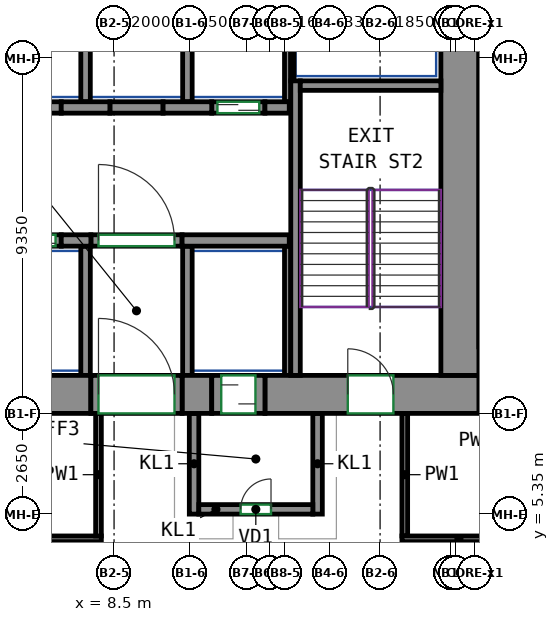
"""IFC4 building model, lengths in metres.
Left out: names, types, materials, properties, quantities, classifications, styles, units other than length and angle.
Written with IfcOpenShell. Run it as: python <this file> out.ifc"""

import sys

from ifc_helpers import new_model, si_unit, direction, frame, frame_2d, origin, place, context, subcontext, project, spatial, rectangle, extrude, source, transform, mapped, element, fill, save


model = new_model("IFC4")
c1 = context("Model", 3, precision=1e-05, world=origin(), true_north=direction((0.0, 1.0)))
c2 = subcontext(c1, "Body", "Model", "MODEL_VIEW")
j1 = project(units=[si_unit("LENGTHUNIT", "METRE"), si_unit("PLANEANGLEUNIT", "RADIAN")], contexts=[c1])
p1 = place(None, origin())
s1 = spatial("IfcSite", under=j1, at=p1, CompositionType="ELEMENT")
p2 = place(p1, origin())
s2 = spatial("IfcBuilding", under=s1, at=p2, CompositionType="ELEMENT")
p3 = place(p2, frame((0.0, 0.0, 67.2)))
s3 = spatial("IfcBuildingStorey", under=s2, at=p3, CompositionType="ELEMENT", Elevation=67.2)
m1 = source(origin(), c2, "Body", "SweptSolid", [
    extrude(rectangle(XDim=14.18, YDim=1.0, at=frame_2d((7.09, 0.0))), origin(), (0.0, 0.0, 1.0), 3.72),
])
p4 = place(p3, frame((-6.29, 8.5, 0.0), z_axis=(0.0, 0.0, 1.0), x_axis=(1.0, 0.0, 0.0)))
e1 = element("IfcWall", 1, at=p4, inside=s3, PredefinedType="SHEAR", context=c2, shape_type="MappedRepresentation", body=[
    mapped(m1, transform((0.0, 0.0, 0.0))),
])
m2 = source(origin(), c2, "Body", "SweptSolid", [
    extrude(rectangle(XDim=0.78, YDim=1.0, at=frame_2d((0.39, 0.0))), origin(), (0.0, 0.0, 1.0), 3.72),
])
p5 = place(p3, frame((10.29, 8.5, 0.0), z_axis=(0.0, 0.0, 1.0), x_axis=(1.0, 0.0, 0.0)))
e2 = element("IfcWall", 2, at=p5, inside=s3, PredefinedType="SHEAR", context=c2, shape_type="MappedRepresentation", body=[
    mapped(m2, transform((0.0, 0.0, 0.0))),
])
m3 = source(origin(), c2, "Body", "SweptSolid", [
    extrude(rectangle(XDim=5.63, YDim=1.0, at=frame_2d((2.815, 0.0))), origin(), (0.0, 0.0, 1.0), 3.72),
])
p6 = place(p3, frame((12.47, 8.5, 0.0), z_axis=(0.0, 0.0, 1.0), x_axis=(1.0, 0.0, 0.0)))
e3 = element("IfcWall", 3, at=p6, inside=s3, PredefinedType="SHEAR", context=c2, shape_type="MappedRepresentation", body=[
    mapped(m3, transform((0.0, 0.0, 0.0))),
])
p7 = place(p6, frame((2.18, 0.0, 0.0)))
e4 = element("IfcOpeningElement", 4, at=p7, cuts=e3, PredefinedType="OPENING", context=c2, shape_type="SweptSolid", body=[
    extrude(rectangle(XDim=1.2, YDim=2.1, at=frame_2d((0.6, 1.05))), frame((0.0, 0.51, 0.0), z_axis=(0.0, -1.0, 0.0), x_axis=(1.0, 0.0, 0.0)), (0.0, 0.0, 1.0), 1.02),
])
m4 = source(origin(), c2, "Body", "SweptSolid", [
    extrude(rectangle(XDim=12.0, YDim=1.0, at=frame_2d((6.0, 0.0))), origin(), (0.0, 0.0, 1.0), 3.72),
])
p8 = place(p3, frame((17.6, 9.0, 0.0), z_axis=(0.0, 0.0, 1.0), x_axis=(0.0, 1.0, 0.0)))
e5 = element("IfcWall", 5, at=p8, inside=s3, PredefinedType="SHEAR", context=c2, shape_type="MappedRepresentation", body=[
    mapped(m4, transform((0.0, 0.0, 0.0))),
])
m5 = source(origin(), c2, "Body", "SweptSolid", [
    extrude(rectangle(XDim=7.75, YDim=0.25, at=frame_2d((3.875, 0.0))), origin(), (0.0, 0.0, 1.0), 3.72),
])
p9 = place(p3, frame((13.275, 9.0, 0.0), z_axis=(0.0, 0.0, 1.0), x_axis=(0.0, 1.0, 0.0)))
e6 = element("IfcWall", 6, at=p9, inside=s3, PredefinedType="SHEAR", context=c2, shape_type="MappedRepresentation", body=[
    mapped(m5, transform((0.0, 0.0, 0.0))),
])
m6 = source(origin(), c2, "Body", "SweptSolid", [
    extrude(rectangle(XDim=3.7, YDim=0.25, at=frame_2d((1.85, 0.0))), origin(), (0.0, 0.0, 1.0), 3.72),
])
p10 = place(p3, frame((13.4, 16.625, 0.0), z_axis=(0.0, 0.0, 1.0), x_axis=(1.0, 0.0, 0.0)))
e7 = element("IfcWall", 7, at=p10, inside=s3, PredefinedType="SHEAR", context=c2, shape_type="MappedRepresentation", body=[
    mapped(m6, transform((0.0, 0.0, 0.0))),
])
m7 = source(origin(), c2, "Body", "SweptSolid", [
    extrude(rectangle(XDim=0.78, YDim=0.3, at=frame_2d((0.39, 0.0))), origin(), (0.0, 0.0, 1.0), 3.72),
])
p11 = place(p3, frame((7.11, 12.55, 0.0), z_axis=(0.0, 0.0, 1.0), x_axis=(1.0, 0.0, 0.0)))
e8 = element("IfcWall", 8, at=p11, inside=s3, PredefinedType="SHEAR", context=c2, shape_type="MappedRepresentation", body=[
    mapped(m7, transform((0.0, 0.0, 0.0))),
])
m8 = source(origin(), c2, "Body", "SweptSolid", [
    extrude(rectangle(XDim=2.82, YDim=0.3, at=frame_2d((1.41, 0.0))), origin(), (0.0, 0.0, 1.0), 3.72),
])
p12 = place(p3, frame((10.29, 12.55, 0.0), z_axis=(0.0, 0.0, 1.0), x_axis=(1.0, 0.0, 0.0)))
e9 = element("IfcWall", 9, at=p12, inside=s3, PredefinedType="SHEAR", context=c2, shape_type="MappedRepresentation", body=[
    mapped(m8, transform((0.0, 0.0, 0.0))),
])
m9 = source(origin(), c2, "Body", "SweptSolid", [
    extrude(rectangle(XDim=1.28, YDim=0.3, at=frame_2d((0.64, 0.0))), origin(), (0.0, 0.0, 1.0), 3.72),
])
p13 = place(p3, frame((7.11, 16.05, 0.0), z_axis=(0.0, 0.0, 1.0), x_axis=(1.0, 0.0, 0.0)))
e10 = element("IfcWall", 10, at=p13, inside=s3, PredefinedType="SHEAR", context=c2, shape_type="MappedRepresentation", body=[
    mapped(m9, transform((0.0, 0.0, 0.0))),
])
m10 = source(origin(), c2, "Body", "SweptSolid", [
    extrude(rectangle(XDim=1.28, YDim=0.3, at=frame_2d((0.64, 0.0))), origin(), (0.0, 0.0, 1.0), 3.72),
])
p14 = place(p3, frame((9.79, 16.05, 0.0), z_axis=(0.0, 0.0, 1.0), x_axis=(1.0, 0.0, 0.0)))
e11 = element("IfcWall", 11, at=p14, inside=s3, PredefinedType="SHEAR", context=c2, shape_type="MappedRepresentation", body=[
    mapped(m10, transform((0.0, 0.0, 0.0))),
])
m11 = source(origin(), c2, "Body", "SweptSolid", [
    extrude(rectangle(XDim=0.64, YDim=0.3, at=frame_2d((0.32, 0.0))), origin(), (0.0, 0.0, 1.0), 3.72),
])
p15 = place(p3, frame((12.47, 16.05, 0.0), z_axis=(0.0, 0.0, 1.0), x_axis=(1.0, 0.0, 0.0)))
e12 = element("IfcWall", 12, at=p15, inside=s3, PredefinedType="SHEAR", context=c2, shape_type="MappedRepresentation", body=[
    mapped(m11, transform((0.0, 0.0, 0.0))),
])
m12 = source(origin(), c2, "Body", "SweptSolid", [
    extrude(rectangle(XDim=1.4, YDim=0.3, at=frame_2d((0.7, 0.0))), origin(), (0.0, 0.0, 1.0), 3.72),
])
p16 = place(p3, frame((5.71, 12.55, 0.0), z_axis=(0.0, 0.0, 1.0), x_axis=(1.0, 0.0, 0.0)))
e13 = element("IfcWall", 13, at=p16, inside=s3, PredefinedType="PARTITIONING", context=c2, shape_type="MappedRepresentation", body=[
    mapped(m12, transform((0.0, 0.0, 0.0))),
])
p17 = place(p16, frame((0.15, 0.0, 0.0)))
e14 = element("IfcOpeningElement", 14, at=p17, cuts=e13, PredefinedType="OPENING", context=c2, shape_type="SweptSolid", body=[
    extrude(rectangle(XDim=1.1, YDim=2.1, at=frame_2d((0.55, 1.05))), frame((0.0, 0.16, 0.0), z_axis=(0.0, -1.0, 0.0), x_axis=(1.0, 0.0, 0.0)), (0.0, 0.0, 1.0), 0.32),
])
m13 = source(origin(), c2, "Body", "SweptSolid", [
    extrude(rectangle(XDim=1.4, YDim=0.3, at=frame_2d((0.7, 0.0))), origin(), (0.0, 0.0, 1.0), 3.72),
])
p18 = place(p3, frame((11.07, 16.05, 0.0), z_axis=(0.0, 0.0, 1.0), x_axis=(1.0, 0.0, 0.0)))
e15 = element("IfcWall", 15, at=p18, inside=s3, PredefinedType="PARTITIONING", context=c2, shape_type="MappedRepresentation", body=[
    mapped(m13, transform((0.0, 0.0, 0.0))),
])
p19 = place(p18, frame((0.15, 0.0, 0.0)))
e16 = element("IfcOpeningElement", 16, at=p19, cuts=e15, PredefinedType="OPENING", context=c2, shape_type="SweptSolid", body=[
    extrude(rectangle(XDim=1.1, YDim=2.1, at=frame_2d((0.55, 1.05))), frame((0.0, 0.16, 0.0), z_axis=(0.0, -1.0, 0.0), x_axis=(1.0, 0.0, 0.0)), (0.0, 0.0, 1.0), 0.32),
])
m14 = source(origin(), c2, "Body", "SweptSolid", [
    extrude(rectangle(XDim=2.4, YDim=0.3, at=frame_2d((1.2, 0.0))), origin(), (0.0, 0.0, 1.0), 3.72),
])
p20 = place(p3, frame((7.89, 12.55, 0.0), z_axis=(0.0, 0.0, 1.0), x_axis=(1.0, 0.0, 0.0)))
e17 = element("IfcWall", 17, at=p20, inside=s3, PredefinedType="PARTITIONING", context=c2, shape_type="MappedRepresentation", body=[
    mapped(m14, transform((0.0, 0.0, 0.0))),
])
p21 = place(p20, frame((0.2, 0.0, 0.0)))
e18 = element("IfcOpeningElement", 18, at=p21, cuts=e17, PredefinedType="OPENING", context=c2, shape_type="SweptSolid", body=[
    extrude(rectangle(XDim=2.0, YDim=2.1, at=frame_2d((1.0, 1.05))), frame((0.0, 0.16, 0.0), z_axis=(0.0, -1.0, 0.0), x_axis=(1.0, 0.0, 0.0)), (0.0, 0.0, 1.0), 0.32),
])
for number, where, z_axis, x_axis in (
    (19, (5.71, 16.05, 0.0), (0.0, 0.0, 1.0), (1.0, 0.0, 0.0)),
    (20, (8.39, 16.05, 0.0), (0.0, 0.0, 1.0), (1.0, 0.0, 0.0)),
):
    element("IfcWall", number, at=place(p3, frame(where, z_axis=z_axis, x_axis=x_axis)), inside=s3, PredefinedType="PARTITIONING", context=c2, shape_type="MappedRepresentation", body=[
        mapped(m12, transform((0.0, 0.0, 0.0))),
    ])
m15 = source(origin(), c2, "Body", "SweptSolid", [
    extrude(rectangle(XDim=2.65, YDim=0.25, at=frame_2d((1.325, 0.0))), origin(), (0.0, 0.0, 1.0), 3.72),
])
for number, where, z_axis, x_axis in (
    (21, (10.605, 5.35, 0.0), (0.0, 0.0, 1.0), (0.0, 1.0, 0.0)),
    (22, (13.855, 5.35, 0.0), (0.0, 0.0, 1.0), (0.0, 1.0, 0.0)),
):
    element("IfcWall", number, at=place(p3, frame(where, z_axis=z_axis, x_axis=x_axis)), inside=s3, PredefinedType="PARTITIONING", context=c2, shape_type="MappedRepresentation", body=[
        mapped(m15, transform((0.0, 0.0, 0.0))),
    ])
m16 = source(origin(), c2, "Body", "SweptSolid", [
    extrude(rectangle(XDim=3.0, YDim=0.25, at=frame_2d((1.5, 0.0))), origin(), (0.0, 0.0, 1.0), 3.72),
])
p22 = place(p3, frame((10.73, 5.475, 0.0), z_axis=(0.0, 0.0, 1.0), x_axis=(1.0, 0.0, 0.0)))
e23 = element("IfcWall", 23, at=p22, inside=s3, PredefinedType="PARTITIONING", context=c2, shape_type="MappedRepresentation", body=[
    mapped(m16, transform((0.0, 0.0, 0.0))),
])
p23 = place(p22, frame((1.1, 0.0, 0.0)))
e24 = element("IfcOpeningElement", 24, at=p23, cuts=e23, PredefinedType="OPENING", context=c2, shape_type="SweptSolid", body=[
    extrude(rectangle(XDim=0.8, YDim=2.0, at=frame_2d((0.4, 1.0))), frame((0.0, 0.135, 0.0), z_axis=(0.0, -1.0, 0.0), x_axis=(1.0, 0.0, 0.0)), (0.0, 0.0, 1.0), 0.27),
])
m17 = source(origin(), c2, "Body", "SweptSolid", [
    extrude(rectangle(XDim=3.275, YDim=0.165, at=frame_2d((1.638, 0.0))), origin(), (0.0, 0.0, 1.0), 3.72),
])
p24 = place(p3, frame((13.067, 16.2, 0.0), z_axis=(0.0, 0.0, 1.0), x_axis=(0.0, 1.0, 0.0)))
e25 = element("IfcWall", 25, at=p24, inside=s3, PredefinedType="PARTITIONING", context=c2, shape_type="MappedRepresentation", body=[
    mapped(m17, transform((0.0, 0.0, 0.0))),
])
m18 = source(origin(), c2, "Body", "SweptSolid", [
    extrude(rectangle(XDim=3.275, YDim=0.25, at=frame_2d((1.638, 0.0))), origin(), (0.0, 0.0, 1.0), 3.72),
])
p25 = place(p3, frame((10.43, 16.2, 0.0), z_axis=(0.0, 0.0, 1.0), x_axis=(0.0, 1.0, 0.0)))
e26 = element("IfcWall", 26, at=p25, inside=s3, PredefinedType="PARTITIONING", context=c2, shape_type="MappedRepresentation", body=[
    mapped(m18, transform((0.0, 0.0, 0.0))),
])
m19 = source(origin(), c2, "Body", "SweptSolid", [
    extrude(rectangle(XDim=2.725, YDim=0.085, at=frame_2d((1.363, 0.0))), origin(), (0.0, 0.0, 1.0), 3.72),
])
p26 = place(p3, frame((13.192, 16.75, 0.0), z_axis=(0.0, 0.0, 1.0), x_axis=(0.0, 1.0, 0.0)))
e27 = element("IfcWall", 27, at=p26, inside=s3, PredefinedType="PARTITIONING", context=c2, shape_type="MappedRepresentation", body=[
    mapped(m19, transform((0.0, 0.0, 0.0))),
])
p27 = place(p3, frame((7.75, 16.2, 0.0), z_axis=(0.0, 0.0, 1.0), x_axis=(0.0, 1.0, 0.0)))
e28 = element("IfcWall", 28, at=p27, inside=s3, PredefinedType="PARTITIONING", context=c2, shape_type="MappedRepresentation", body=[
    mapped(m18, transform((0.0, 0.0, 0.0))),
])
m20 = source(origin(), c2, "Body", "SweptSolid", [
    extrude(rectangle(XDim=3.4, YDim=0.25, at=frame_2d((1.7, 0.0))), origin(), (0.0, 0.0, 1.0), 3.72),
])
p28 = place(p3, frame((10.43, 9.0, 0.0), z_axis=(0.0, 0.0, 1.0), x_axis=(0.0, 1.0, 0.0)))
e29 = element("IfcWall", 29, at=p28, inside=s3, PredefinedType="PARTITIONING", context=c2, shape_type="MappedRepresentation", body=[
    mapped(m20, transform((0.0, 0.0, 0.0))),
])
m21 = source(origin(), c2, "Body", "SweptSolid", [
    extrude(rectangle(XDim=3.4, YDim=0.165, at=frame_2d((1.7, 0.0))), origin(), (0.0, 0.0, 1.0), 3.72),
])
p29 = place(p3, frame((13.067, 9.0, 0.0), z_axis=(0.0, 0.0, 1.0), x_axis=(0.0, 1.0, 0.0)))
e30 = element("IfcWall", 30, at=p29, inside=s3, PredefinedType="PARTITIONING", context=c2, shape_type="MappedRepresentation", body=[
    mapped(m21, transform((0.0, 0.0, 0.0))),
])
p30 = place(p3, frame((7.75, 9.0, 0.0), z_axis=(0.0, 0.0, 1.0), x_axis=(0.0, 1.0, 0.0)))
e31 = element("IfcWall", 31, at=p30, inside=s3, PredefinedType="PARTITIONING", context=c2, shape_type="MappedRepresentation", body=[
    mapped(m20, transform((0.0, 0.0, 0.0))),
])
m22 = source(origin(), c2, "Body", "SweptSolid", [
    extrude(rectangle(XDim=2.4, YDim=1.0, at=frame_2d((1.2, 0.0))), origin(), (0.0, 0.0, 1.0), 2.7),
])
p31 = place(p3, frame((7.89, 8.5, 0.0), z_axis=(0.0, 0.0, 1.0), x_axis=(1.0, 0.0, 0.0)))
e32 = element("IfcWall", 32, at=p31, inside=s3, PredefinedType="PARTITIONING", context=c2, shape_type="MappedRepresentation", body=[
    mapped(m22, transform((0.0, 0.0, 0.0))),
])
p32 = place(p31, frame((0.2, 0.0, 0.0)))
e33 = element("IfcOpeningElement", 33, at=p32, cuts=e32, PredefinedType="OPENING", context=c2, shape_type="SweptSolid", body=[
    extrude(rectangle(XDim=2.0, YDim=2.1, at=frame_2d((1.0, 1.05))), frame((0.0, 0.51, 0.0), z_axis=(0.0, -1.0, 0.0), x_axis=(1.0, 0.0, 0.0)), (0.0, 0.0, 1.0), 1.02),
])
m23 = source(origin(), c2, "Body", "SweptSolid", [
    extrude(rectangle(XDim=1.4, YDim=1.0, at=frame_2d((0.7, 0.0))), origin(), (0.0, 0.0, 1.0), 2.7),
])
p33 = place(p3, frame((11.07, 8.5, 0.0), z_axis=(0.0, 0.0, 1.0), x_axis=(1.0, 0.0, 0.0)))
e34 = element("IfcWall", 34, at=p33, inside=s3, PredefinedType="PARTITIONING", context=c2, shape_type="MappedRepresentation", body=[
    mapped(m23, transform((0.0, 0.0, 0.0))),
])
p34 = place(p33, frame((0.25, 0.0, 0.0)))
e35 = element("IfcOpeningElement", 35, at=p34, cuts=e34, PredefinedType="OPENING", context=c2, shape_type="SweptSolid", body=[
    extrude(rectangle(XDim=0.9, YDim=2.1, at=frame_2d((0.45, 1.05))), frame((0.0, 0.51, 0.0), z_axis=(0.0, -1.0, 0.0), x_axis=(1.0, 0.0, 0.0)), (0.0, 0.0, 1.0), 1.02),
])
p35 = place(p3, frame((-7.805, 4.7, 0.0), z_axis=(0.0, 0.0, 1.0), x_axis=(1.0, 0.0, 0.0)))
e36 = element("IfcWall", 36, at=p35, inside=s3, PredefinedType="PARTITIONING", context=c2, shape_type="SweptSolid", body=[
    extrude(rectangle(XDim=15.97, YDim=0.15, at=frame_2d((7.985, 0.0))), origin(), (0.0, 0.0, 1.0), 3.72),
])
p36 = place(p35, frame((6.43, 0.0, 0.0)))
e37 = element("IfcOpeningElement", 37, at=p36, cuts=e36, PredefinedType="OPENING", context=c2, shape_type="SweptSolid", body=[
    extrude(rectangle(XDim=1.0, YDim=2.1, at=frame_2d((0.5, 1.05))), frame((0.0, 0.085, 0.0), z_axis=(0.0, -1.0, 0.0), x_axis=(1.0, 0.0, 0.0)), (0.0, 0.0, 1.0), 0.17),
])
for number, where, z_axis, x_axis in (
    (38, (8.09, 8.0, 0.0), (0.0, 0.0, 1.0), (0.0, -1.0, 0.0)),
    (39, (16.15, 4.775, 0.0), (0.0, 0.0, 1.0), (0.0, 1.0, 0.0)),
):
    element("IfcWall", number, at=place(p3, frame(where, z_axis=z_axis, x_axis=x_axis)), inside=s3, PredefinedType="PARTITIONING", context=c2, shape_type="SweptSolid", body=[
        extrude(rectangle(XDim=3.225, YDim=0.15, at=frame_2d((1.613, 0.0))), origin(), (0.0, 0.0, 1.0), 3.72),
    ])
p37 = place(p3, frame((16.075, 4.7, 0.0), z_axis=(0.0, 0.0, 1.0), x_axis=(1.0, 0.0, 0.0)))
e40 = element("IfcWall", 40, at=p37, inside=s3, PredefinedType="PARTITIONING", context=c2, shape_type="SweptSolid", body=[
    extrude(rectangle(XDim=3.0, YDim=0.15, at=frame_2d((1.5, 0.0))), origin(), (0.0, 0.0, 1.0), 3.72),
])
p38 = place(p21, origin())
e41 = element("IfcDoor", 41, at=p38, inside=s3, OperationType="DOUBLE_DOOR_SINGLE_SWING", PredefinedType="DOOR", context=c2, shape_type="SweptSolid", body=[
    extrude(rectangle(XDim=2.0, YDim=2.1, at=frame_2d((1.0, 1.05))), frame((0.0, 0.025, 0.0), z_axis=(0.0, -1.0, 0.0), x_axis=(1.0, 0.0, 0.0)), (0.0, 0.0, 1.0), 0.05),
])
fill(e18, e41)
p39 = place(p32, origin())
e42 = element("IfcDoor", 42, at=p39, inside=s3, OperationType="DOUBLE_DOOR_SINGLE_SWING", PredefinedType="DOOR", context=c2, shape_type="SweptSolid", body=[
    extrude(rectangle(XDim=2.0, YDim=2.1, at=frame_2d((1.0, 1.05))), frame((0.0, 0.405, 0.0), z_axis=(0.0, -1.0, 0.0), x_axis=(1.0, 0.0, 0.0)), (0.0, 0.0, 1.0), 0.05),
])
fill(e33, e42)
p40 = place(p23, origin())
e43 = element("IfcDoor", 43, at=p40, inside=s3, OperationType="SINGLE_SWING_RIGHT", PredefinedType="DOOR", context=c2, shape_type="SweptSolid", body=[
    extrude(rectangle(XDim=0.8, YDim=2.0, at=frame_2d((0.4, 1.0))), frame((0.0, 0.025, 0.0), z_axis=(0.0, -1.0, 0.0), x_axis=(1.0, 0.0, 0.0)), (0.0, 0.0, 1.0), 0.05),
])
fill(e24, e43)
p41 = place(p34, origin())
e44 = element("IfcDoor", 44, at=p41, inside=s3, OperationType="SLIDING_TO_LEFT", PredefinedType="DOOR", context=c2, shape_type="SweptSolid", body=[
    extrude(rectangle(XDim=0.9, YDim=2.1, at=frame_2d((0.45, 1.05))), frame((0.0, 0.405, 0.0), z_axis=(0.0, -1.0, 0.0), x_axis=(1.0, 0.0, 0.0)), (0.0, 0.0, 1.0), 0.05),
])
fill(e35, e44)
p42 = place(p17, origin())
e45 = element("IfcDoor", 45, at=p42, inside=s3, OperationType="DOUBLE_DOOR_SLIDING", PredefinedType="DOOR", context=c2, shape_type="SweptSolid", body=[
    extrude(rectangle(XDim=1.1, YDim=2.1, at=frame_2d((0.55, 1.05))), frame((0.0, 0.025, 0.0), z_axis=(0.0, -1.0, 0.0), x_axis=(1.0, 0.0, 0.0)), (0.0, 0.0, 1.0), 0.05),
])
fill(e14, e45)
p43 = place(p19, origin())
e46 = element("IfcDoor", 46, at=p43, inside=s3, OperationType="DOUBLE_DOOR_SLIDING", PredefinedType="DOOR", context=c2, shape_type="SweptSolid", body=[
    extrude(rectangle(XDim=1.1, YDim=2.1, at=frame_2d((0.55, 1.05))), frame((0.0, 0.025, 0.0), z_axis=(0.0, -1.0, 0.0), x_axis=(1.0, 0.0, 0.0)), (0.0, 0.0, 1.0), 0.05),
])
fill(e16, e46)
p44 = place(p7, origin())
e47 = element("IfcDoor", 47, at=p44, inside=s3, OperationType="DOUBLE_DOOR_SINGLE_SWING", PredefinedType="DOOR", context=c2, shape_type="SweptSolid", body=[
    extrude(rectangle(XDim=1.2, YDim=2.1, at=frame_2d((0.6, 1.05))), frame((0.0, 0.405, 0.0), z_axis=(0.0, -1.0, 0.0), x_axis=(1.0, 0.0, 0.0)), (0.0, 0.0, 1.0), 0.05),
])
fill(e4, e47)
save(model, sys.argv[1])
